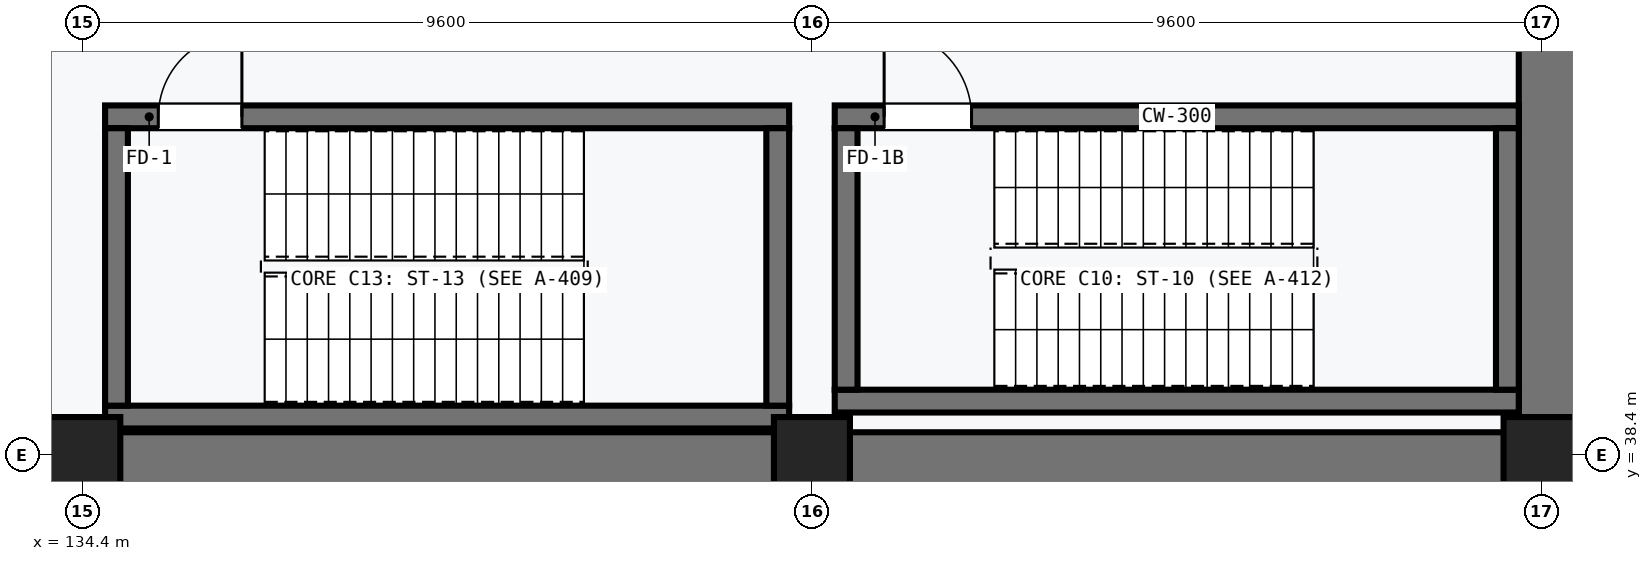
"""IFC4 building model, lengths in metres.
Left out: names, types, materials, properties, quantities, classifications, styles, units other than length and angle.
Written with IfcOpenShell. Run it as: python <this file> out.ifc"""

import sys

from ifc_helpers import new_model, si_unit, direction, frame, frame_2d, origin, origin_2d, place, context, subcontext, project, spatial, rectangle, extrude, element, fill, save


model = new_model("IFC4")
c1 = context("Model", 3, precision=1e-05, world=origin(), true_north=direction((0.0, 1.0)))
c2 = subcontext(c1, "Body", "Model", "MODEL_VIEW")
j1 = project(units=[si_unit("LENGTHUNIT", "METRE"), si_unit("PLANEANGLEUNIT", "RADIAN")], contexts=[c1])
p1 = place(None, origin())
s1 = spatial("IfcSite", under=j1, at=p1, CompositionType="ELEMENT")
p2 = place(p1, origin())
s2 = spatial("IfcBuilding", under=s1, at=p2, CompositionType="ELEMENT")
p3 = place(p2, frame((0.0, 0.0, -10.8)))
s3 = spatial("IfcBuildingStorey", under=s2, at=p3, CompositionType="ELEMENT", Elevation=-10.8)
p4 = place(p3, frame((153.7, 76.9, 0.0), z_axis=(0.0, 0.0, 1.0), x_axis=(0.0, -1.0, 0.0)))
e1 = element("IfcWall", 1, at=p4, inside=s3, PredefinedType="SOLIDWALL", context=c2, shape_type="SweptSolid", body=[
    extrude(rectangle(XDim=38.6, YDim=0.8, at=frame_2d((19.3, 0.0))), origin(), (0.0, 0.0, 1.0), 5.05),
])
p5 = place(p3, frame((153.7, 38.3, 0.0), z_axis=(0.0, 0.0, 1.0), x_axis=(-1.0, 0.0, 0.0)))
e2 = element("IfcWall", 2, at=p5, inside=s3, PredefinedType="SOLIDWALL", context=c2, shape_type="SweptSolid", body=[
    extrude(rectangle(XDim=96.0, YDim=0.8, at=frame_2d((48.0, 0.0))), origin(), (0.0, 0.0, 1.0), 5.05),
])
for number, where, z_axis, x_axis in (
    (3, (134.4, 38.4, 0.0), (0.0, 0.0, 1.0), (1.0, 0.0, 0.0)),
    (4, (144.0, 38.4, 0.0), (0.0, 0.0, 1.0), (1.0, 0.0, 0.0)),
    (5, (153.6, 38.4, 0.0), (0.0, 0.0, 1.0), (1.0, 0.0, 0.0)),
):
    element("IfcColumn", number, at=place(p3, frame(where, z_axis=z_axis, x_axis=x_axis)), inside=s3, PredefinedType="COLUMN", context=c2, shape_type="SweptSolid", body=[
        extrude(rectangle(XDim=1.0, YDim=1.0, at=origin_2d()), origin(), (0.0, 0.0, 1.0), 5.05),
    ])
p6 = place(p3, frame((144.3, 39.11, 0.0), z_axis=(0.0, 0.0, 1.0), x_axis=(1.0, 0.0, 0.0)))
e6 = element("IfcWall", 6, at=p6, inside=s3, PredefinedType="SHEAR", context=c2, shape_type="SweptSolid", body=[
    extrude(rectangle(XDim=9.0, YDim=0.3, at=frame_2d((4.5, 0.0))), origin(), (0.0, 0.0, 1.0), 5.05),
])
p7 = place(p3, frame((153.3, 42.85, 0.0), z_axis=(0.0, 0.0, 1.0), x_axis=(-1.0, 0.0, 0.0)))
e7 = element("IfcWall", 7, at=p7, inside=s3, PredefinedType="SHEAR", context=c2, shape_type="SweptSolid", body=[
    extrude(rectangle(XDim=9.0, YDim=0.3, at=frame_2d((4.5, 0.0))), origin(), (0.0, 0.0, 1.0), 5.05),
])
p8 = place(p7, frame((7.2, 0.0, 0.0)))
e8 = element("IfcOpeningElement", 8, at=p8, cuts=e7, PredefinedType="OPENING", context=c2, shape_type="SweptSolid", body=[
    extrude(rectangle(XDim=1.15, YDim=2.15, at=frame_2d((0.575, 1.075))), frame((0.0, 0.16, 0.0), z_axis=(0.0, -1.0, 0.0), x_axis=(1.0, 0.0, 0.0)), (0.0, 0.0, 1.0), 0.32),
])
for number, where, z_axis, x_axis in (
    (9, (144.45, 39.26, 0.0), (0.0, 0.0, 1.0), (0.0, 1.0, 0.0)),
    (10, (153.15, 42.7, 0.0), (0.0, 0.0, 1.0), (0.0, -1.0, 0.0)),
):
    element("IfcWall", number, at=place(p3, frame(where, z_axis=z_axis, x_axis=x_axis)), inside=s3, PredefinedType="SHEAR", context=c2, shape_type="SweptSolid", body=[
        extrude(rectangle(XDim=3.44, YDim=0.3, at=frame_2d((1.72, 0.0))), origin(), (0.0, 0.0, 1.0), 5.05),
    ])
p9 = place(p3, frame((134.7, 38.9, 0.0), z_axis=(0.0, 0.0, 1.0), x_axis=(1.0, 0.0, 0.0)))
e11 = element("IfcWall", 11, at=p9, inside=s3, PredefinedType="SHEAR", context=c2, shape_type="SweptSolid", body=[
    extrude(rectangle(XDim=9.0, YDim=0.3, at=frame_2d((4.5, 0.0))), origin(), (0.0, 0.0, 1.0), 5.05),
])
p10 = place(p3, frame((143.7, 42.85, 0.0), z_axis=(0.0, 0.0, 1.0), x_axis=(-1.0, 0.0, 0.0)))
e12 = element("IfcWall", 12, at=p10, inside=s3, PredefinedType="SHEAR", context=c2, shape_type="SweptSolid", body=[
    extrude(rectangle(XDim=9.0, YDim=0.3, at=frame_2d((4.5, 0.0))), origin(), (0.0, 0.0, 1.0), 5.05),
])
p11 = place(p10, frame((7.2, 0.0, 0.0)))
e13 = element("IfcOpeningElement", 13, at=p11, cuts=e12, PredefinedType="OPENING", context=c2, shape_type="SweptSolid", body=[
    extrude(rectangle(XDim=1.1, YDim=2.15, at=frame_2d((0.55, 1.075))), frame((0.0, 0.16, 0.0), z_axis=(0.0, -1.0, 0.0), x_axis=(1.0, 0.0, 0.0)), (0.0, 0.0, 1.0), 0.32),
])
for number, where, z_axis, x_axis in (
    (14, (134.85, 39.05, 0.0), (0.0, 0.0, 1.0), (0.0, 1.0, 0.0)),
    (15, (143.55, 42.7, 0.0), (0.0, 0.0, 1.0), (0.0, -1.0, 0.0)),
):
    element("IfcWall", number, at=place(p3, frame(where, z_axis=z_axis, x_axis=x_axis)), inside=s3, PredefinedType="SHEAR", context=c2, shape_type="SweptSolid", body=[
        extrude(rectangle(XDim=3.65, YDim=0.3, at=frame_2d((1.825, 0.0))), origin(), (0.0, 0.0, 1.0), 5.05),
    ])
p12 = place(p8, frame((1.15, 0.0, 0.0), z_axis=(0.0, 0.0, 1.0), x_axis=(-1.0, 0.0, 0.0)))
e16 = element("IfcDoor", 16, at=p12, inside=s3, OperationType="SINGLE_SWING_RIGHT", PredefinedType="DOOR", context=c2, shape_type="SweptSolid", body=[
    extrude(rectangle(XDim=1.15, YDim=2.15, at=frame_2d((0.575, 1.075))), frame((0.0, 0.025, 0.0), z_axis=(0.0, -1.0, 0.0), x_axis=(1.0, 0.0, 0.0)), (0.0, 0.0, 1.0), 0.05),
])
fill(e8, e16)
p13 = place(p11, frame((1.1, 0.0, 0.0), z_axis=(0.0, 0.0, 1.0), x_axis=(-1.0, 0.0, 0.0)))
e17 = element("IfcDoor", 17, at=p13, inside=s3, OperationType="SINGLE_SWING_LEFT", PredefinedType="DOOR", context=c2, shape_type="SweptSolid", body=[
    extrude(rectangle(XDim=1.1, YDim=2.15, at=frame_2d((0.55, 1.075))), frame((0.0, 0.025, 0.0), z_axis=(0.0, -1.0, 0.0), x_axis=(1.0, 0.0, 0.0)), (0.0, 0.0, 1.0), 0.05),
])
fill(e13, e17)
save(model, sys.argv[1])
